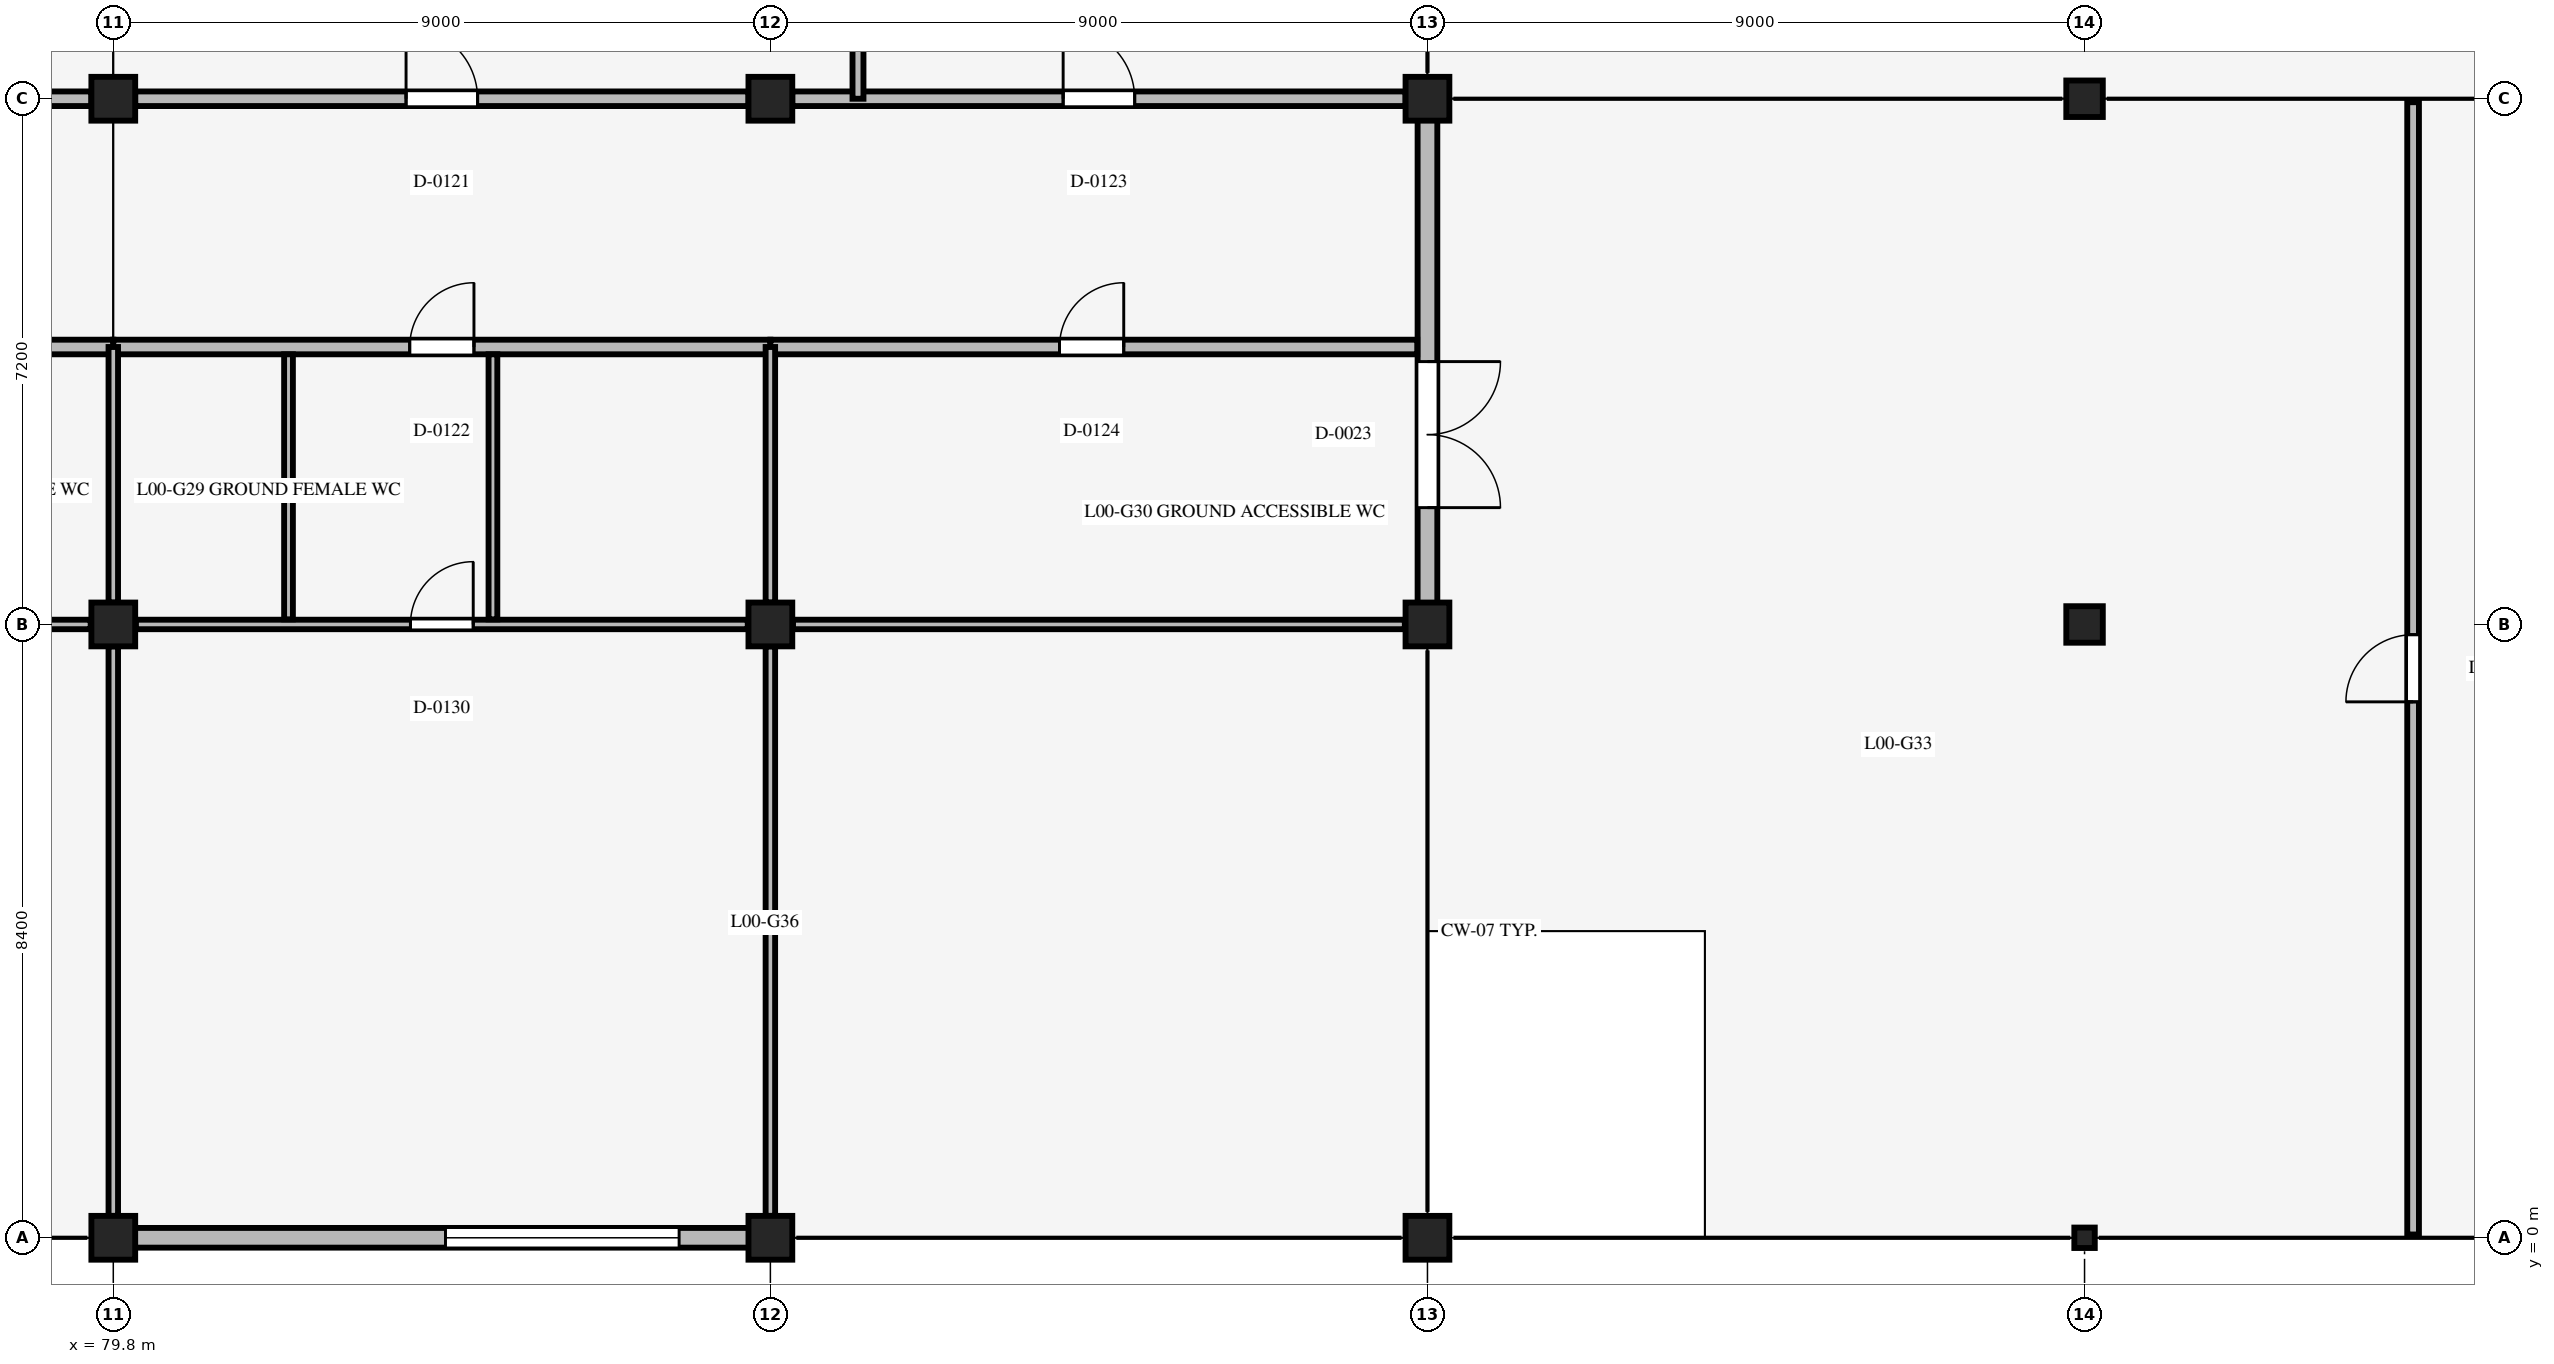
"""IFC4 building model, lengths in metres.
Left out: names, types, materials, properties, quantities, classifications, styles, units other than length and angle.
Written with IfcOpenShell. Run it as: python <this file> out.ifc"""

import sys

from ifc_helpers import new_model, si_unit, direction, frame, frame_2d, origin, origin_2d, place, context, subcontext, project, spatial, rectangle, i_section, extrude, element, fill, save


model = new_model("IFC4")
c1 = context("Model", 3, precision=1e-05, world=origin(), true_north=direction((0.0, 1.0)))
c2 = subcontext(c1, "Body", "Model", "MODEL_VIEW")
j1 = project(units=[si_unit("LENGTHUNIT", "METRE"), si_unit("PLANEANGLEUNIT", "RADIAN")], contexts=[c1])
p1 = place(None, origin())
s1 = spatial("IfcSite", under=j1, at=p1, CompositionType="ELEMENT")
p2 = place(p1, origin())
s2 = spatial("IfcBuilding", under=s1, at=p2, CompositionType="ELEMENT")
p3 = place(p2, origin())
s3 = spatial("IfcBuildingStorey", under=s2, at=p3, CompositionType="ELEMENT", Elevation=0.0)
for number, where, z_axis, x_axis in (
    (1, (79.8, 0.0, 0.0), (0.0, 0.0, 1.0), (1.0, 0.0, 0.0)),
    (2, (79.8, 8.4, 0.0), (0.0, 0.0, 1.0), (1.0, 0.0, 0.0)),
    (3, (79.8, 15.6, 0.0), (0.0, 0.0, 1.0), (1.0, 0.0, 0.0)),
    (4, (88.8, 0.0, 0.0), (0.0, 0.0, 1.0), (1.0, 0.0, 0.0)),
    (5, (88.8, 8.4, 0.0), (0.0, 0.0, 1.0), (1.0, 0.0, 0.0)),
    (6, (88.8, 15.6, 0.0), (0.0, 0.0, 1.0), (1.0, 0.0, 0.0)),
    (7, (97.8, 0.0, 0.0), (0.0, 0.0, 1.0), (1.0, 0.0, 0.0)),
    (8, (97.8, 8.4, 0.0), (0.0, 0.0, 1.0), (1.0, 0.0, 0.0)),
    (9, (97.8, 15.6, 0.0), (0.0, 0.0, 1.0), (1.0, 0.0, 0.0)),
):
    element("IfcColumn", number, at=place(p3, frame(where, z_axis=z_axis, x_axis=x_axis)), inside=s3, PredefinedType="COLUMN", context=c2, shape_type="SweptSolid", body=[
        extrude(rectangle(XDim=0.6, YDim=0.6, at=origin_2d()), origin(), (0.0, 0.0, 1.0), 6.0),
    ])
p4 = place(p3, frame((106.8, 0.0, 0.0), z_axis=(0.0, 0.0, 1.0), x_axis=(1.0, 0.0, 0.0)))
e10 = element("IfcColumn", 10, at=p4, inside=s3, PredefinedType="COLUMN", context=c2, shape_type="SweptSolid", body=[
    extrude(i_section(OverallWidth=0.28, OverallDepth=0.28, WebThickness=0.01, FlangeThickness=0.018, FilletRadius=0.024, at=origin_2d()), origin(), (0.0, 0.0, 1.0), 4.96),
])
for number, where, z_axis, x_axis in (
    (11, (106.8, 8.4, 0.0), (0.0, 0.0, 1.0), (1.0, 0.0, 0.0)),
    (12, (106.8, 15.6, 0.0), (0.0, 0.0, 1.0), (1.0, 0.0, 0.0)),
):
    element("IfcColumn", number, at=place(p3, frame(where, z_axis=z_axis, x_axis=x_axis)), inside=s3, PredefinedType="COLUMN", context=c2, shape_type="SweptSolid", body=[
        extrude(rectangle(XDim=0.5, YDim=0.5, at=origin_2d()), origin(), (0.0, 0.0, 1.0), 4.96),
    ])
p5 = place(p3, frame((88.51, 0.0, 0.0), z_axis=(0.0, 0.0, 1.0), x_axis=(-1.0, 0.0, 0.0)))
e13 = element("IfcWall", 13, at=p5, inside=s3, PredefinedType="STANDARD", context=c2, shape_type="SweptSolid", body=[
    extrude(rectangle(XDim=8.42, YDim=0.27, at=frame_2d((4.21, 0.0))), origin(), (0.0, 0.0, 1.0), 5.381),
])
p6 = place(p5, frame((0.96, 0.0, 0.9)))
e14 = element("IfcOpeningElement", 14, at=p6, cuts=e13, PredefinedType="OPENING", context=c2, shape_type="SweptSolid", body=[
    extrude(rectangle(XDim=3.2, YDim=2.1, at=frame_2d((1.6, 1.05))), frame((0.0, 0.145, 0.0), z_axis=(0.0, -1.0, 0.0), x_axis=(1.0, 0.0, 0.0)), (0.0, 0.0, 1.0), 0.29),
])
p7 = place(p3, frame((97.8, 15.31, 0.0), z_axis=(0.0, 0.0, 1.0), x_axis=(0.0, -1.0, 0.0)))
e15 = element("IfcWall", 15, at=p7, inside=s3, PredefinedType="STANDARD", context=c2, shape_type="SweptSolid", body=[
    extrude(rectangle(XDim=6.62, YDim=0.27, at=frame_2d((3.31, 0.0))), origin(), (0.0, 0.0, 1.0), 4.701),
])
p8 = place(p7, frame((3.31, 0.0, 0.0)))
e16 = element("IfcOpeningElement", 16, at=p8, cuts=e15, PredefinedType="OPENING", context=c2, shape_type="SweptSolid", body=[
    extrude(rectangle(XDim=2.0, YDim=2.4, at=frame_2d((1.0, 1.2))), frame((0.0, 0.145, 0.0), z_axis=(0.0, -1.0, 0.0), x_axis=(1.0, 0.0, 0.0)), (0.0, 0.0, 1.0), 0.29),
])
p9 = place(p3, frame((71.7, 15.6, 0.0), z_axis=(0.0, 0.0, 1.0), x_axis=(1.0, 0.0, 0.0)))
e17 = element("IfcWall", 17, at=p9, inside=s3, PredefinedType="STANDARD", context=c2, shape_type="SweptSolid", body=[
    extrude(rectangle(XDim=7.8, YDim=0.2, at=frame_2d((3.9, 0.0))), origin(), (0.0, 0.0, 1.0), 3.05),
])
p10 = place(p9, frame((3.11, 0.0, 0.0)))
e18 = element("IfcOpeningElement", 18, at=p10, cuts=e17, PredefinedType="OPENING", context=c2, shape_type="SweptSolid", body=[
    extrude(rectangle(XDim=0.98, YDim=2.15, at=frame_2d((0.49, 1.075))), frame((0.0, 0.11, 0.0), z_axis=(0.0, -1.0, 0.0), x_axis=(1.0, 0.0, 0.0)), (0.0, 0.0, 1.0), 0.22),
])
p11 = place(p3, frame((71.4, 12.2, 0.0), z_axis=(0.0, 0.0, 1.0), x_axis=(1.0, 0.0, 0.0)))
e19 = element("IfcWall", 19, at=p11, inside=s3, PredefinedType="STANDARD", context=c2, shape_type="SweptSolid", body=[
    extrude(rectangle(XDim=8.4, YDim=0.2, at=frame_2d((4.2, 0.0))), origin(), (0.0, 0.0, 1.0), 3.05),
])
p12 = place(p11, frame((3.76, 0.0, 0.0)))
e20 = element("IfcOpeningElement", 20, at=p12, cuts=e19, PredefinedType="OPENING", context=c2, shape_type="SweptSolid", body=[
    extrude(rectangle(XDim=0.88, YDim=2.1, at=frame_2d((0.44, 1.05))), frame((0.0, 0.11, 0.0), z_axis=(0.0, -1.0, 0.0), x_axis=(1.0, 0.0, 0.0)), (0.0, 0.0, 1.0), 0.22),
])
p13 = place(p3, frame((80.1, 15.6, 0.0), z_axis=(0.0, 0.0, 1.0), x_axis=(1.0, 0.0, 0.0)))
e21 = element("IfcWall", 21, at=p13, inside=s3, PredefinedType="STANDARD", context=c2, shape_type="SweptSolid", body=[
    extrude(rectangle(XDim=8.4, YDim=0.2, at=frame_2d((4.2, 0.0))), origin(), (0.0, 0.0, 1.0), 3.05),
])
p14 = place(p13, frame((3.71, 0.0, 0.0)))
e22 = element("IfcOpeningElement", 22, at=p14, cuts=e21, PredefinedType="OPENING", context=c2, shape_type="SweptSolid", body=[
    extrude(rectangle(XDim=0.98, YDim=2.15, at=frame_2d((0.49, 1.075))), frame((0.0, 0.11, 0.0), z_axis=(0.0, -1.0, 0.0), x_axis=(1.0, 0.0, 0.0)), (0.0, 0.0, 1.0), 0.22),
])
p15 = place(p3, frame((79.8, 12.2, 0.0), z_axis=(0.0, 0.0, 1.0), x_axis=(1.0, 0.0, 0.0)))
e23 = element("IfcWall", 23, at=p15, inside=s3, PredefinedType="STANDARD", context=c2, shape_type="SweptSolid", body=[
    extrude(rectangle(XDim=9.0, YDim=0.2, at=frame_2d((4.5, 0.0))), origin(), (0.0, 0.0, 1.0), 3.05),
])
p16 = place(p15, frame((4.06, 0.0, 0.0)))
e24 = element("IfcOpeningElement", 24, at=p16, cuts=e23, PredefinedType="OPENING", context=c2, shape_type="SweptSolid", body=[
    extrude(rectangle(XDim=0.88, YDim=2.1, at=frame_2d((0.44, 1.05))), frame((0.0, 0.11, 0.0), z_axis=(0.0, -1.0, 0.0), x_axis=(1.0, 0.0, 0.0)), (0.0, 0.0, 1.0), 0.22),
])
p17 = place(p3, frame((89.1, 15.6, 0.0), z_axis=(0.0, 0.0, 1.0), x_axis=(1.0, 0.0, 0.0)))
e25 = element("IfcWall", 25, at=p17, inside=s3, PredefinedType="STANDARD", context=c2, shape_type="SweptSolid", body=[
    extrude(rectangle(XDim=8.4, YDim=0.2, at=frame_2d((4.2, 0.0))), origin(), (0.0, 0.0, 1.0), 3.05),
])
p18 = place(p17, frame((3.71, 0.0, 0.0)))
e26 = element("IfcOpeningElement", 26, at=p18, cuts=e25, PredefinedType="OPENING", context=c2, shape_type="SweptSolid", body=[
    extrude(rectangle(XDim=0.98, YDim=2.15, at=frame_2d((0.49, 1.075))), frame((0.0, 0.11, 0.0), z_axis=(0.0, -1.0, 0.0), x_axis=(1.0, 0.0, 0.0)), (0.0, 0.0, 1.0), 0.22),
])
p19 = place(p3, frame((88.8, 12.2, 0.0), z_axis=(0.0, 0.0, 1.0), x_axis=(1.0, 0.0, 0.0)))
e27 = element("IfcWall", 27, at=p19, inside=s3, PredefinedType="STANDARD", context=c2, shape_type="SweptSolid", body=[
    extrude(rectangle(XDim=8.86, YDim=0.2, at=frame_2d((4.43, 0.0))), origin(), (0.0, 0.0, 1.0), 3.05),
])
p20 = place(p19, frame((3.96, 0.0, 0.0)))
e28 = element("IfcOpeningElement", 28, at=p20, cuts=e27, PredefinedType="OPENING", context=c2, shape_type="SweptSolid", body=[
    extrude(rectangle(XDim=0.88, YDim=2.1, at=frame_2d((0.44, 1.05))), frame((0.0, 0.11, 0.0), z_axis=(0.0, -1.0, 0.0), x_axis=(1.0, 0.0, 0.0)), (0.0, 0.0, 1.0), 0.22),
])
p21 = place(p3, frame((90.0, 15.6, 0.0), z_axis=(0.0, 0.0, 1.0), x_axis=(0.0, 1.0, 0.0)))
e29 = element("IfcWall", 29, at=p21, inside=s3, PredefinedType="STANDARD", context=c2, shape_type="SweptSolid", body=[
    extrude(rectangle(XDim=16.65, YDim=0.15, at=frame_2d((8.325, 0.0))), origin(), (0.0, 0.0, 1.0), 3.05),
])
p22 = place(p21, frame((6.065, 0.0, 0.0)))
e30 = element("IfcOpeningElement", 30, at=p22, cuts=e29, PredefinedType="OPENING", context=c2, shape_type="SweptSolid", body=[
    extrude(rectangle(XDim=0.92, YDim=2.15, at=frame_2d((0.46, 1.075))), frame((0.0, 0.085, 0.0), z_axis=(0.0, -1.0, 0.0), x_axis=(1.0, 0.0, 0.0)), (0.0, 0.0, 1.0), 0.17),
])
p23 = place(p3, frame((79.8, 0.3, 0.0), z_axis=(0.0, 0.0, 1.0), x_axis=(0.0, 1.0, 0.0)))
e31 = element("IfcWall", 31, at=p23, inside=s3, PredefinedType="STANDARD", context=c2, shape_type="SweptSolid", body=[
    extrude(rectangle(XDim=7.8, YDim=0.13, at=frame_2d((3.9, 0.0))), origin(), (0.0, 0.0, 1.0), 3.05),
])
p24 = place(p3, frame((79.8, 8.7, 0.0), z_axis=(0.0, 0.0, 1.0), x_axis=(0.0, 1.0, 0.0)))
e32 = element("IfcWall", 32, at=p24, inside=s3, PredefinedType="STANDARD", context=c2, shape_type="SweptSolid", body=[
    extrude(rectangle(XDim=3.5, YDim=0.13, at=frame_2d((1.75, 0.0))), origin(), (0.0, 0.0, 1.0), 3.05),
])
p25 = place(p3, frame((88.8, 0.3, 0.0), z_axis=(0.0, 0.0, 1.0), x_axis=(0.0, 1.0, 0.0)))
e33 = element("IfcWall", 33, at=p25, inside=s3, PredefinedType="STANDARD", context=c2, shape_type="SweptSolid", body=[
    extrude(rectangle(XDim=7.8, YDim=0.13, at=frame_2d((3.9, 0.0))), origin(), (0.0, 0.0, 1.0), 3.05),
])
p26 = place(p3, frame((88.8, 8.7, 0.0), z_axis=(0.0, 0.0, 1.0), x_axis=(0.0, 1.0, 0.0)))
e34 = element("IfcWall", 34, at=p26, inside=s3, PredefinedType="STANDARD", context=c2, shape_type="SweptSolid", body=[
    extrude(rectangle(XDim=3.5, YDim=0.13, at=frame_2d((1.75, 0.0))), origin(), (0.0, 0.0, 1.0), 3.05),
])
p27 = place(p3, frame((71.71, 8.4, 0.0), z_axis=(0.0, 0.0, 1.0), x_axis=(1.0, 0.0, 0.0)))
e35 = element("IfcWall", 35, at=p27, inside=s3, PredefinedType="STANDARD", context=c2, shape_type="SweptSolid", body=[
    extrude(rectangle(XDim=7.78, YDim=0.13, at=frame_2d((3.89, 0.0))), origin(), (0.0, 0.0, 1.0), 3.05),
])
p28 = place(p3, frame((80.11, 8.4, 0.0), z_axis=(0.0, 0.0, 1.0), x_axis=(1.0, 0.0, 0.0)))
e36 = element("IfcWall", 36, at=p28, inside=s3, PredefinedType="STANDARD", context=c2, shape_type="SweptSolid", body=[
    extrude(rectangle(XDim=8.38, YDim=0.13, at=frame_2d((4.19, 0.0))), origin(), (0.0, 0.0, 1.0), 3.05),
])
p29 = place(p28, frame((3.76, 0.0, 0.0)))
e37 = element("IfcOpeningElement", 37, at=p29, cuts=e36, PredefinedType="OPENING", context=c2, shape_type="SweptSolid", body=[
    extrude(rectangle(XDim=0.86, YDim=2.1, at=frame_2d((0.43, 1.05))), frame((0.0, 0.075, 0.0), z_axis=(0.0, -1.0, 0.0), x_axis=(1.0, 0.0, 0.0)), (0.0, 0.0, 1.0), 0.15),
])
p30 = place(p3, frame((89.11, 8.4, 0.0), z_axis=(0.0, 0.0, 1.0), x_axis=(1.0, 0.0, 0.0)))
e38 = element("IfcWall", 38, at=p30, inside=s3, PredefinedType="STANDARD", context=c2, shape_type="SweptSolid", body=[
    extrude(rectangle(XDim=8.38, YDim=0.13, at=frame_2d((4.19, 0.0))), origin(), (0.0, 0.0, 1.0), 3.05),
])
for number, where, z_axis, x_axis in (
    (39, (82.2, 8.47, 0.0), (0.0, 0.0, 1.0), (0.0, 1.0, 0.0)),
    (40, (85.0, 8.47, 0.0), (0.0, 0.0, 1.0), (0.0, 1.0, 0.0)),
):
    element("IfcWall", number, at=place(p3, frame(where, z_axis=z_axis, x_axis=x_axis)), inside=s3, PredefinedType="STANDARD", context=c2, shape_type="SweptSolid", body=[
        extrude(rectangle(XDim=3.63, YDim=0.12, at=frame_2d((1.815, 0.0))), origin(), (0.0, 0.0, 1.0), 3.05),
    ])
p31 = place(p3, frame((111.3, 0.045, 0.0), z_axis=(0.0, 0.0, 1.0), x_axis=(0.0, 1.0, 0.0)))
e41 = element("IfcWall", 41, at=p31, inside=s3, PredefinedType="STANDARD", context=c2, shape_type="SweptSolid", body=[
    extrude(rectangle(XDim=15.508, YDim=0.16, at=frame_2d((7.754, 0.0))), origin(), (0.0, 0.0, 1.0), 3.05),
])
p32 = place(p31, frame((7.295, 0.0, 0.0)))
e42 = element("IfcOpeningElement", 42, at=p32, cuts=e41, PredefinedType="OPENING", context=c2, shape_type="SweptSolid", body=[
    extrude(rectangle(XDim=0.92, YDim=2.15, at=frame_2d((0.46, 1.075))), frame((0.0, 0.09, 0.0), z_axis=(0.0, -1.0, 0.0), x_axis=(1.0, 0.0, 0.0)), (0.0, 0.0, 1.0), 0.18),
])
p33 = place(p6, origin())
e43 = element("IfcWindow", 43, at=p33, inside=s3, PartitioningType="SINGLE_PANEL", PredefinedType="WINDOW", context=c2, shape_type="SweptSolid", body=[
    extrude(rectangle(XDim=3.2, YDim=2.1, at=frame_2d((1.6, 1.05))), frame((0.0, 0.03, 0.0), z_axis=(0.0, -1.0, 0.0), x_axis=(1.0, 0.0, 0.0)), (0.0, 0.0, 1.0), 0.06),
])
fill(e14, e43)
p34 = place(p8, origin())
e44 = element("IfcDoor", 44, at=p34, inside=s3, OperationType="DOUBLE_DOOR_SINGLE_SWING", PredefinedType="DOOR", context=c2, shape_type="SweptSolid", body=[
    extrude(rectangle(XDim=2.0, YDim=2.4, at=frame_2d((1.0, 1.2))), frame((0.0, 0.025, 0.0), z_axis=(0.0, -1.0, 0.0), x_axis=(1.0, 0.0, 0.0)), (0.0, 0.0, 1.0), 0.05),
])
fill(e16, e44)
p35 = place(p14, origin())
e45 = element("IfcDoor", 45, at=p35, inside=s3, OperationType="SINGLE_SWING_LEFT", PredefinedType="DOOR", context=c2, shape_type="SweptSolid", body=[
    extrude(rectangle(XDim=0.98, YDim=2.15, at=frame_2d((0.49, 1.075))), frame((0.0, 0.025, 0.0), z_axis=(0.0, -1.0, 0.0), x_axis=(1.0, 0.0, 0.0)), (0.0, 0.0, 1.0), 0.05),
])
fill(e22, e45)
p36 = place(p16, origin())
e46 = element("IfcDoor", 46, at=p36, inside=s3, OperationType="SINGLE_SWING_RIGHT", PredefinedType="DOOR", context=c2, shape_type="SweptSolid", body=[
    extrude(rectangle(XDim=0.88, YDim=2.1, at=frame_2d((0.44, 1.05))), frame((0.0, 0.025, 0.0), z_axis=(0.0, -1.0, 0.0), x_axis=(1.0, 0.0, 0.0)), (0.0, 0.0, 1.0), 0.05),
])
fill(e24, e46)
p37 = place(p18, origin())
e47 = element("IfcDoor", 47, at=p37, inside=s3, OperationType="SINGLE_SWING_LEFT", PredefinedType="DOOR", context=c2, shape_type="SweptSolid", body=[
    extrude(rectangle(XDim=0.98, YDim=2.15, at=frame_2d((0.49, 1.075))), frame((0.0, 0.025, 0.0), z_axis=(0.0, -1.0, 0.0), x_axis=(1.0, 0.0, 0.0)), (0.0, 0.0, 1.0), 0.05),
])
fill(e26, e47)
p38 = place(p20, origin())
e48 = element("IfcDoor", 48, at=p38, inside=s3, OperationType="SINGLE_SWING_RIGHT", PredefinedType="DOOR", context=c2, shape_type="SweptSolid", body=[
    extrude(rectangle(XDim=0.88, YDim=2.1, at=frame_2d((0.44, 1.05))), frame((0.0, 0.025, 0.0), z_axis=(0.0, -1.0, 0.0), x_axis=(1.0, 0.0, 0.0)), (0.0, 0.0, 1.0), 0.05),
])
fill(e28, e48)
p39 = place(p29, origin())
e49 = element("IfcDoor", 49, at=p39, inside=s3, OperationType="SINGLE_SWING_RIGHT", PredefinedType="DOOR", context=c2, shape_type="SweptSolid", body=[
    extrude(rectangle(XDim=0.86, YDim=2.1, at=frame_2d((0.43, 1.05))), frame((0.0, 0.025, 0.0), z_axis=(0.0, -1.0, 0.0), x_axis=(1.0, 0.0, 0.0)), (0.0, 0.0, 1.0), 0.05),
])
fill(e37, e49)
p40 = place(p32, origin())
e50 = element("IfcDoor", 50, at=p40, inside=s3, OperationType="SINGLE_SWING_LEFT", PredefinedType="DOOR", context=c2, shape_type="SweptSolid", body=[
    extrude(rectangle(XDim=0.92, YDim=2.15, at=frame_2d((0.46, 1.075))), frame((0.0, 0.025, 0.0), z_axis=(0.0, -1.0, 0.0), x_axis=(1.0, 0.0, 0.0)), (0.0, 0.0, 1.0), 0.05),
])
fill(e42, e50)
save(model, sys.argv[1])
